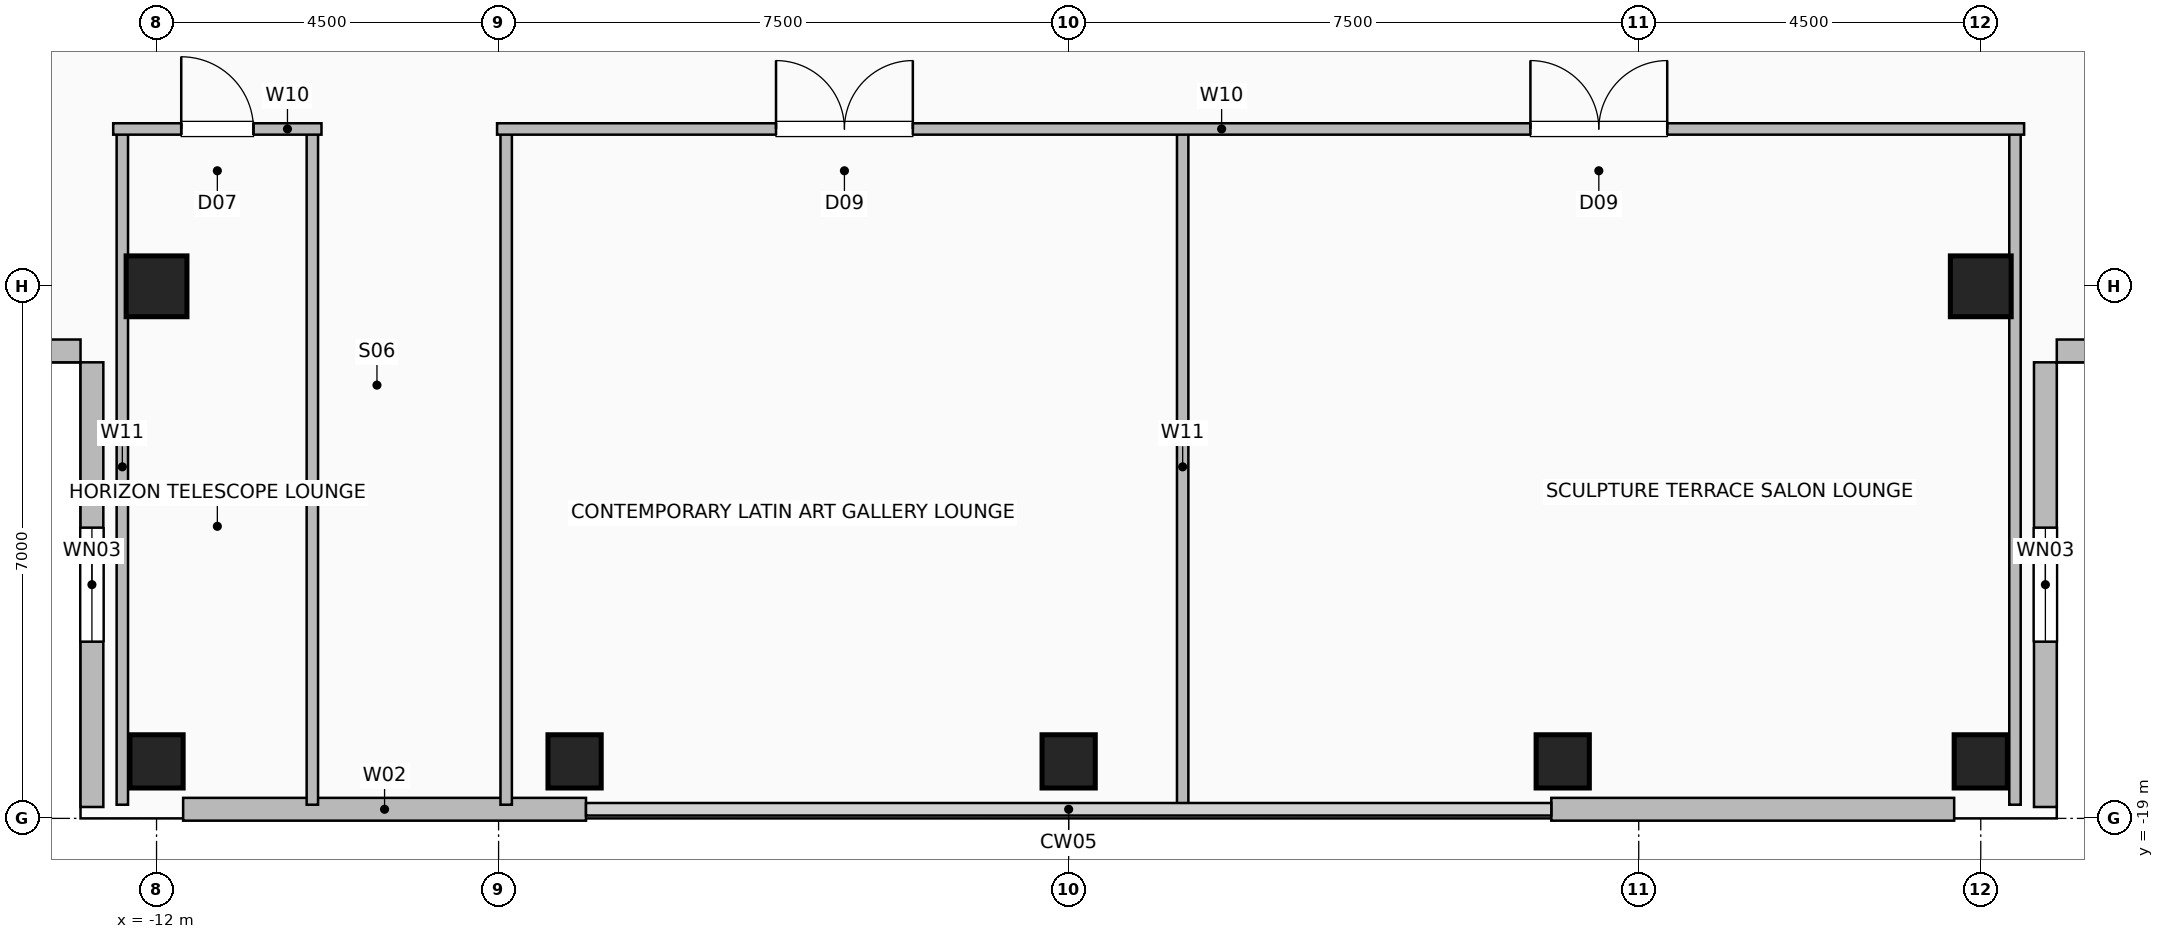
"""IFC4 building model, lengths in metres.
Left out: names, types, materials, properties, quantities, classifications, styles, units other than length and angle.
Written with IfcOpenShell. Run it as: python <this file> out.ifc"""

import sys

from ifc_helpers import new_model, si_unit, direction, frame, frame_2d, origin, origin_2d, place, context, subcontext, project, spatial, rectangle, hollow_rectangle, extrude, element, fill, save


model = new_model("IFC4")
c1 = context("Model", 3, precision=1e-05, world=origin(), true_north=direction((0.0, 1.0)))
c2 = subcontext(c1, "Body", "Model", "MODEL_VIEW")
j1 = project(units=[si_unit("LENGTHUNIT", "METRE"), si_unit("PLANEANGLEUNIT", "RADIAN")], contexts=[c1])
p1 = place(None, origin())
s1 = spatial("IfcSite", under=j1, at=p1, CompositionType="ELEMENT")
p2 = place(p1, origin())
s2 = spatial("IfcBuilding", under=s1, at=p2, CompositionType="ELEMENT")
p3 = place(p2, frame((0.0, 0.0, 268.4)))
s3 = spatial("IfcBuildingStorey", under=s2, at=p3, CompositionType="ELEMENT", Elevation=268.4)
for number, where, z_axis, x_axis in (
    (1, (-12.0, -18.25, 0.0), (0.0, 0.0, 1.0), (1.0, 0.0, 0.0)),
    (2, (-6.5, -18.25, 0.0), (0.0, 0.0, 1.0), (1.0, 0.0, 0.0)),
    (3, (0.0, -18.25, 0.0), (0.0, 0.0, 1.0), (1.0, 0.0, 0.0)),
    (4, (6.5, -18.25, 0.0), (0.0, 0.0, 1.0), (1.0, 0.0, 0.0)),
    (5, (12.0, -18.25, 0.0), (0.0, 0.0, 1.0), (1.0, 0.0, 0.0)),
):
    element("IfcColumn", number, at=place(p3, frame(where, z_axis=z_axis, x_axis=x_axis)), inside=s3, PredefinedType="COLUMN", context=c2, shape_type="SweptSolid", body=[
        extrude(hollow_rectangle(XDim=0.7, YDim=0.7, WallThickness=0.035, at=origin_2d()), origin(), (0.0, 0.0, 1.0), 3.6),
    ])
for number, where, z_axis, x_axis in (
    (6, (-12.0, -12.0, 0.0), (0.0, 0.0, 1.0), (1.0, 0.0, 0.0)),
    (7, (12.0, -12.0, 0.0), (0.0, 0.0, 1.0), (1.0, 0.0, 0.0)),
):
    element("IfcColumn", number, at=place(p3, frame(where, z_axis=z_axis, x_axis=x_axis)), inside=s3, PredefinedType="COLUMN", context=c2, shape_type="SweptSolid", body=[
        extrude(hollow_rectangle(XDim=0.8, YDim=0.8, WallThickness=0.04, at=origin_2d()), origin(), (0.0, 0.0, 1.0), 3.6),
    ])
for number, where, z_axis, x_axis in (
    (8, (-11.65, -18.88, 0.0), (0.0, 0.0, 1.0), (1.0, 0.0, 0.0)),
    (9, (6.35, -18.88, 0.0), (0.0, 0.0, 1.0), (1.0, 0.0, 0.0)),
):
    element("IfcWall", number, at=place(p3, frame(where, z_axis=z_axis, x_axis=x_axis)), inside=s3, PredefinedType="SOLIDWALL", context=c2, shape_type="SweptSolid", body=[
        extrude(rectangle(XDim=5.3, YDim=0.3, at=frame_2d((2.65, 0.0))), origin(), (0.0, 0.0, 1.0), 3.36),
    ])
p4 = place(p3, frame((-12.85, -18.85, 0.0), z_axis=(0.0, 0.0, 1.0), x_axis=(0.0, 1.0, 0.0)))
e10 = element("IfcWall", 10, at=p4, inside=s3, PredefinedType="SOLIDWALL", context=c2, shape_type="SweptSolid", body=[
    extrude(rectangle(XDim=5.85, YDim=0.3, at=frame_2d((2.925, 0.0))), origin(), (0.0, 0.0, 1.0), 3.36),
])
p5 = place(p4, frame((2.175, 0.0, 0.9)))
e11 = element("IfcOpeningElement", 11, at=p5, cuts=e10, PredefinedType="OPENING", context=c2, shape_type="SweptSolid", body=[
    extrude(rectangle(XDim=1.5, YDim=1.8, at=frame_2d((0.75, 0.9))), frame((0.0, 0.16, 0.0), z_axis=(0.0, -1.0, 0.0), x_axis=(1.0, 0.0, 0.0)), (0.0, 0.0, 1.0), 0.32),
])
p6 = place(p3, frame((-18.85, -12.85, 0.0), z_axis=(0.0, 0.0, 1.0), x_axis=(1.0, 0.0, 0.0)))
e12 = element("IfcWall", 12, at=p6, inside=s3, PredefinedType="SOLIDWALL", context=c2, shape_type="SweptSolid", body=[
    extrude(rectangle(XDim=5.85, YDim=0.3, at=frame_2d((2.925, 0.0))), origin(), (0.0, 0.0, 1.0), 3.36),
])
p7 = place(p3, frame((12.85, -18.85, 0.0), z_axis=(0.0, 0.0, 1.0), x_axis=(0.0, 1.0, 0.0)))
e13 = element("IfcWall", 13, at=p7, inside=s3, PredefinedType="SOLIDWALL", context=c2, shape_type="SweptSolid", body=[
    extrude(rectangle(XDim=5.85, YDim=0.3, at=frame_2d((2.925, 0.0))), origin(), (0.0, 0.0, 1.0), 3.36),
])
p8 = place(p7, frame((2.175, 0.0, 0.9)))
e14 = element("IfcOpeningElement", 14, at=p8, cuts=e13, PredefinedType="OPENING", context=c2, shape_type="SweptSolid", body=[
    extrude(rectangle(XDim=1.5, YDim=1.8, at=frame_2d((0.75, 0.9))), frame((0.0, 0.16, 0.0), z_axis=(0.0, -1.0, 0.0), x_axis=(1.0, 0.0, 0.0)), (0.0, 0.0, 1.0), 0.32),
])
p9 = place(p3, frame((18.85, -12.85, 0.0), z_axis=(0.0, 0.0, 1.0), x_axis=(-1.0, 0.0, 0.0)))
e15 = element("IfcWall", 15, at=p9, inside=s3, PredefinedType="SOLIDWALL", context=c2, shape_type="SweptSolid", body=[
    extrude(rectangle(XDim=5.85, YDim=0.3, at=frame_2d((2.925, 0.0))), origin(), (0.0, 0.0, 1.0), 3.36),
])
for number, where, z_axis, x_axis in (
    (16, (-12.45, -18.82, 0.0), (0.0, 0.0, 1.0), (0.0, 1.0, 0.0)),
    (17, (-9.95, -18.82, 0.0), (0.0, 0.0, 1.0), (0.0, 1.0, 0.0)),
):
    element("IfcWall", number, at=place(p3, frame(where, z_axis=z_axis, x_axis=x_axis)), inside=s3, PredefinedType="PARTITIONING", context=c2, shape_type="SweptSolid", body=[
        extrude(rectangle(XDim=8.89, YDim=0.15, at=frame_2d((4.445, 0.0))), origin(), (0.0, 0.0, 1.0), 3.36),
    ])
p10 = place(p3, frame((-12.57, -9.93, 0.0), z_axis=(0.0, 0.0, 1.0), x_axis=(1.0, 0.0, 0.0)))
e18 = element("IfcWall", 18, at=p10, inside=s3, PredefinedType="PARTITIONING", context=c2, shape_type="SweptSolid", body=[
    extrude(rectangle(XDim=2.74, YDim=0.15, at=frame_2d((1.37, 0.0))), origin(), (0.0, 0.0, 1.0), 3.36),
])
p11 = place(p10, frame((0.895, 0.0, 0.0)))
e19 = element("IfcOpeningElement", 19, at=p11, cuts=e18, PredefinedType="OPENING", context=c2, shape_type="SweptSolid", body=[
    extrude(rectangle(XDim=0.95, YDim=2.06, at=frame_2d((0.475, 1.03))), frame((0.0, 0.085, 0.0), z_axis=(0.0, -1.0, 0.0), x_axis=(1.0, 0.0, 0.0)), (0.0, 0.0, 1.0), 0.17),
])
for number, where, z_axis, x_axis in (
    (20, (-7.4, -18.82, 0.0), (0.0, 0.0, 1.0), (0.0, 1.0, 0.0)),
    (21, (1.5, -18.82, 0.0), (0.0, 0.0, 1.0), (0.0, 1.0, 0.0)),
    (22, (12.45, -18.82, 0.0), (0.0, 0.0, 1.0), (0.0, 1.0, 0.0)),
):
    element("IfcWall", number, at=place(p3, frame(where, z_axis=z_axis, x_axis=x_axis)), inside=s3, PredefinedType="PARTITIONING", context=c2, shape_type="SweptSolid", body=[
        extrude(rectangle(XDim=8.89, YDim=0.15, at=frame_2d((4.445, 0.0))), origin(), (0.0, 0.0, 1.0), 3.36),
    ])
p12 = place(p3, frame((-7.52, -9.93, 0.0), z_axis=(0.0, 0.0, 1.0), x_axis=(1.0, 0.0, 0.0)))
e23 = element("IfcWall", 23, at=p12, inside=s3, PredefinedType="PARTITIONING", context=c2, shape_type="SweptSolid", body=[
    extrude(rectangle(XDim=20.09, YDim=0.15, at=frame_2d((10.045, 0.0))), origin(), (0.0, 0.0, 1.0), 3.36),
])
p13 = place(p12, frame((3.67, 0.0, 0.0)))
e24 = element("IfcOpeningElement", 24, at=p13, cuts=e23, PredefinedType="OPENING", context=c2, shape_type="SweptSolid", body=[
    extrude(rectangle(XDim=1.8, YDim=2.08, at=frame_2d((0.9, 1.04))), frame((0.0, 0.085, 0.0), z_axis=(0.0, -1.0, 0.0), x_axis=(1.0, 0.0, 0.0)), (0.0, 0.0, 1.0), 0.17),
])
p14 = place(p12, frame((13.595, 0.0, 0.0)))
e25 = element("IfcOpeningElement", 25, at=p14, cuts=e23, PredefinedType="OPENING", context=c2, shape_type="SweptSolid", body=[
    extrude(rectangle(XDim=1.8, YDim=2.08, at=frame_2d((0.9, 1.04))), frame((0.0, 0.085, 0.0), z_axis=(0.0, -1.0, 0.0), x_axis=(1.0, 0.0, 0.0)), (0.0, 0.0, 1.0), 0.17),
])
p15 = place(p5, origin())
e26 = element("IfcWindow", 26, at=p15, inside=s3, PartitioningType="SINGLE_PANEL", PredefinedType="WINDOW", context=c2, shape_type="SweptSolid", body=[
    extrude(rectangle(XDim=1.5, YDim=1.8, at=frame_2d((0.75, 0.9))), frame((0.0, 0.03, 0.0), z_axis=(0.0, -1.0, 0.0), x_axis=(1.0, 0.0, 0.0)), (0.0, 0.0, 1.0), 0.06),
])
fill(e11, e26)
p16 = place(p8, origin())
e27 = element("IfcWindow", 27, at=p16, inside=s3, PartitioningType="SINGLE_PANEL", PredefinedType="WINDOW", context=c2, shape_type="SweptSolid", body=[
    extrude(rectangle(XDim=1.5, YDim=1.8, at=frame_2d((0.75, 0.9))), frame((0.0, 0.03, 0.0), z_axis=(0.0, -1.0, 0.0), x_axis=(1.0, 0.0, 0.0)), (0.0, 0.0, 1.0), 0.06),
])
fill(e14, e27)
p17 = place(p11, origin())
e28 = element("IfcDoor", 28, at=p17, inside=s3, OperationType="SINGLE_SWING_LEFT", PredefinedType="DOOR", context=c2, shape_type="SweptSolid", body=[
    extrude(rectangle(XDim=0.95, YDim=2.06, at=frame_2d((0.475, 1.03))), frame((0.0, 0.025, 0.0), z_axis=(0.0, -1.0, 0.0), x_axis=(1.0, 0.0, 0.0)), (0.0, 0.0, 1.0), 0.05),
])
fill(e19, e28)
p18 = place(p13, origin())
e29 = element("IfcDoor", 29, at=p18, inside=s3, OperationType="DOUBLE_DOOR_SINGLE_SWING", PredefinedType="DOOR", context=c2, shape_type="SweptSolid", body=[
    extrude(rectangle(XDim=1.8, YDim=2.08, at=frame_2d((0.9, 1.04))), frame((0.0, 0.025, 0.0), z_axis=(0.0, -1.0, 0.0), x_axis=(1.0, 0.0, 0.0)), (0.0, 0.0, 1.0), 0.05),
])
fill(e24, e29)
p19 = place(p14, origin())
e30 = element("IfcDoor", 30, at=p19, inside=s3, OperationType="DOUBLE_DOOR_SINGLE_SWING", PredefinedType="DOOR", context=c2, shape_type="SweptSolid", body=[
    extrude(rectangle(XDim=1.8, YDim=2.08, at=frame_2d((0.9, 1.04))), frame((0.0, 0.025, 0.0), z_axis=(0.0, -1.0, 0.0), x_axis=(1.0, 0.0, 0.0)), (0.0, 0.0, 1.0), 0.05),
])
fill(e25, e30)
save(model, sys.argv[1])
